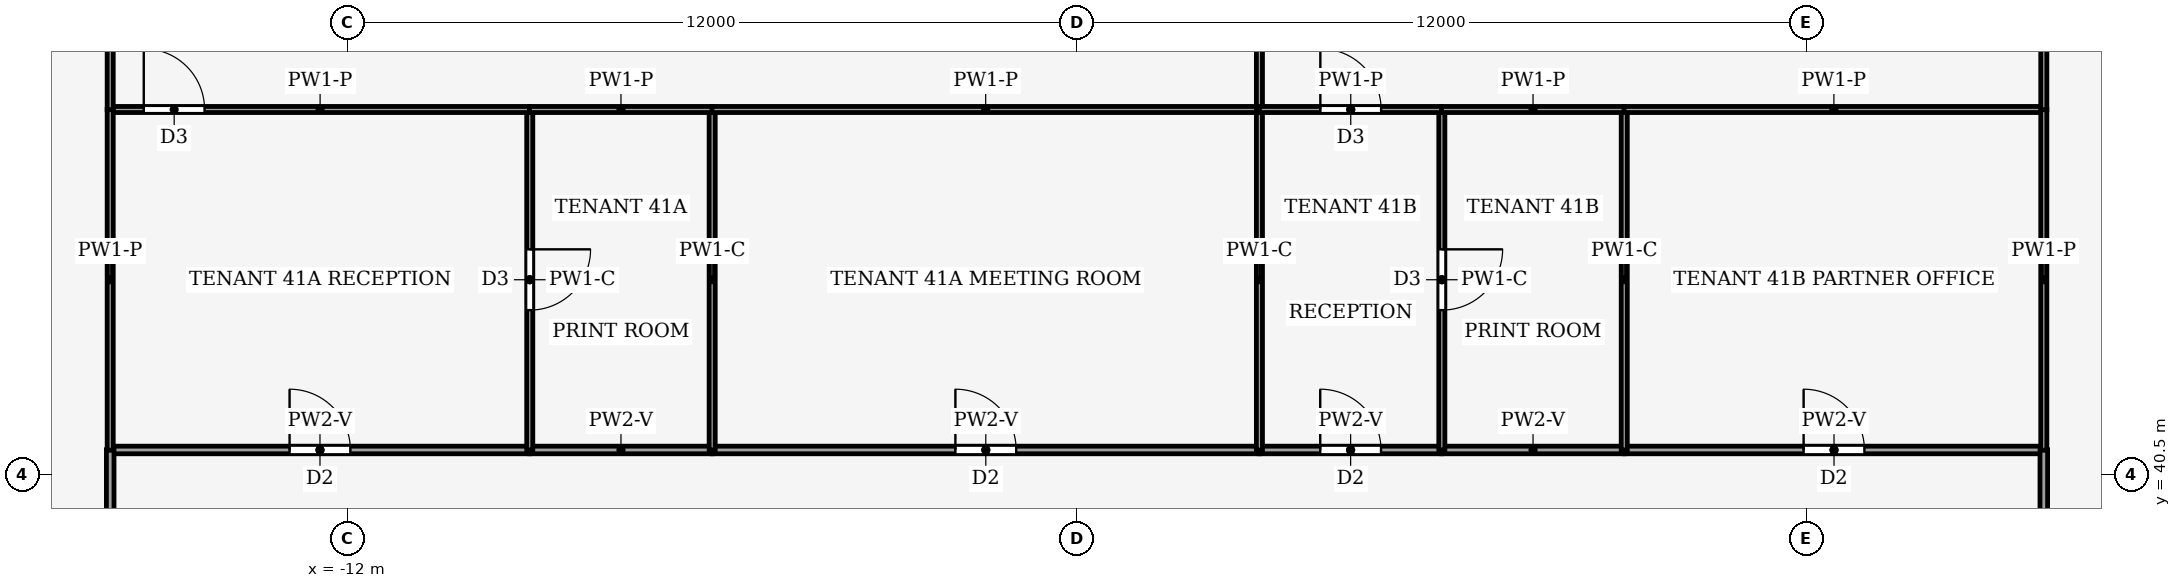
"""IFC4 building model, lengths in metres.
Left out: names, types, materials, properties, quantities, classifications, styles, units other than length and angle.
Written with IfcOpenShell. Run it as: python <this file> out.ifc"""

import sys

from ifc_helpers import new_model, si_unit, direction, frame, frame_2d, origin, place, context, subcontext, project, spatial, rectangle, extrude, element, fill, save


model = new_model("IFC4")
c1 = context("Model", 3, precision=1e-05, world=origin(), true_north=direction((0.0, 1.0)))
c2 = subcontext(c1, "Body", "Model", "MODEL_VIEW")
j1 = project(units=[si_unit("LENGTHUNIT", "METRE"), si_unit("PLANEANGLEUNIT", "RADIAN")], contexts=[c1])
p1 = place(None, origin())
s1 = spatial("IfcSite", under=j1, at=p1, CompositionType="ELEMENT")
p2 = place(p1, origin())
s2 = spatial("IfcBuilding", under=s1, at=p2, CompositionType="ELEMENT")
p3 = place(p2, frame((0.0, 0.0, 182.0)))
s3 = spatial("IfcBuildingStorey", under=s2, at=p3, CompositionType="ELEMENT", Elevation=182.0)
p4 = place(p3, frame((-15.9, 40.9, 0.0), z_axis=(0.0, 0.0, 1.0), x_axis=(1.0, 0.0, 0.0)))
e1 = element("IfcWall", 1, at=p4, inside=s3, PredefinedType="PARTITIONING", context=c2, shape_type="SweptSolid", body=[
    extrude(rectangle(XDim=6.9, YDim=0.125, at=frame_2d((3.45, 0.0))), origin(), (0.0, 0.0, 1.0), 3.44),
])
p5 = place(p4, frame((2.95, 0.0, 0.0)))
e2 = element("IfcOpeningElement", 2, at=p5, cuts=e1, PredefinedType="OPENING", context=c2, shape_type="SweptSolid", body=[
    extrude(rectangle(XDim=1.0, YDim=2.1, at=frame_2d((0.5, 1.05))), frame((0.0, 0.073, 0.0), z_axis=(0.0, -1.0, 0.0), x_axis=(1.0, 0.0, 0.0)), (0.0, 0.0, 1.0), 0.145),
])
p6 = place(p3, frame((-6.0, 40.9, 0.0), z_axis=(0.0, 0.0, 1.0), x_axis=(-1.0, 0.0, 0.0)))
e3 = element("IfcWall", 3, at=p6, inside=s3, PredefinedType="PARTITIONING", context=c2, shape_type="SweptSolid", body=[
    extrude(rectangle(XDim=3.0, YDim=0.125, at=frame_2d((1.5, 0.0))), origin(), (0.0, 0.0, 1.0), 3.44),
])
p7 = place(p3, frame((-6.0, 40.9, 0.0), z_axis=(0.0, 0.0, 1.0), x_axis=(1.0, 0.0, 0.0)))
e4 = element("IfcWall", 4, at=p7, inside=s3, PredefinedType="PARTITIONING", context=c2, shape_type="SweptSolid", body=[
    extrude(rectangle(XDim=9.0, YDim=0.125, at=frame_2d((4.5, 0.0))), origin(), (0.0, 0.0, 1.0), 3.44),
])
p8 = place(p7, frame((4.0, 0.0, 0.0)))
e5 = element("IfcOpeningElement", 5, at=p8, cuts=e4, PredefinedType="OPENING", context=c2, shape_type="SweptSolid", body=[
    extrude(rectangle(XDim=1.0, YDim=2.1, at=frame_2d((0.5, 1.05))), frame((0.0, 0.073, 0.0), z_axis=(0.0, -1.0, 0.0), x_axis=(1.0, 0.0, 0.0)), (0.0, 0.0, 1.0), 0.145),
])
p9 = place(p3, frame((3.0, 40.9, 0.0), z_axis=(0.0, 0.0, 1.0), x_axis=(1.0, 0.0, 0.0)))
e6 = element("IfcWall", 6, at=p9, inside=s3, PredefinedType="PARTITIONING", context=c2, shape_type="SweptSolid", body=[
    extrude(rectangle(XDim=3.0, YDim=0.125, at=frame_2d((1.5, 0.0))), origin(), (0.0, 0.0, 1.0), 3.44),
])
p10 = place(p9, frame((1.0, 0.0, 0.0)))
e7 = element("IfcOpeningElement", 7, at=p10, cuts=e6, PredefinedType="OPENING", context=c2, shape_type="SweptSolid", body=[
    extrude(rectangle(XDim=1.0, YDim=2.1, at=frame_2d((0.5, 1.05))), frame((0.0, 0.073, 0.0), z_axis=(0.0, -1.0, 0.0), x_axis=(1.0, 0.0, 0.0)), (0.0, 0.0, 1.0), 0.145),
])
p11 = place(p3, frame((9.0, 40.9, 0.0), z_axis=(0.0, 0.0, 1.0), x_axis=(-1.0, 0.0, 0.0)))
e8 = element("IfcWall", 8, at=p11, inside=s3, PredefinedType="PARTITIONING", context=c2, shape_type="SweptSolid", body=[
    extrude(rectangle(XDim=3.0, YDim=0.125, at=frame_2d((1.5, 0.0))), origin(), (0.0, 0.0, 1.0), 3.44),
])
p12 = place(p3, frame((9.0, 40.9, 0.0), z_axis=(0.0, 0.0, 1.0), x_axis=(1.0, 0.0, 0.0)))
e9 = element("IfcWall", 9, at=p12, inside=s3, PredefinedType="PARTITIONING", context=c2, shape_type="SweptSolid", body=[
    extrude(rectangle(XDim=6.9, YDim=0.125, at=frame_2d((3.45, 0.0))), origin(), (0.0, 0.0, 1.0), 3.44),
])
p13 = place(p12, frame((2.95, 0.0, 0.0)))
e10 = element("IfcOpeningElement", 10, at=p13, cuts=e9, PredefinedType="OPENING", context=c2, shape_type="SweptSolid", body=[
    extrude(rectangle(XDim=1.0, YDim=2.1, at=frame_2d((0.5, 1.05))), frame((0.0, 0.073, 0.0), z_axis=(0.0, -1.0, 0.0), x_axis=(1.0, 0.0, 0.0)), (0.0, 0.0, 1.0), 0.145),
])
p14 = place(p3, frame((-15.9, 34.5, 0.0), z_axis=(0.0, 0.0, 1.0), x_axis=(0.0, 1.0, 0.0)))
e11 = element("IfcWall", 11, at=p14, inside=s3, PredefinedType="PARTITIONING", context=c2, shape_type="SweptSolid", body=[
    extrude(rectangle(XDim=6.404, YDim=0.125, at=frame_2d((3.202, 0.0))), origin(), (0.0, 0.0, 1.0), 3.14),
])
p15 = place(p14, frame((2.702, 0.0, 0.0)))
e12 = element("IfcOpeningElement", 12, at=p15, cuts=e11, PredefinedType="OPENING", context=c2, shape_type="SweptSolid", body=[
    extrude(rectangle(XDim=1.0, YDim=2.1, at=frame_2d((0.5, 1.05))), frame((0.0, 0.073, 0.0), z_axis=(0.0, -1.0, 0.0), x_axis=(1.0, 0.0, 0.0)), (0.0, 0.0, 1.0), 0.145),
])
p16 = place(p3, frame((15.9, 40.904, 0.0), z_axis=(0.0, 0.0, 1.0), x_axis=(0.0, -1.0, 0.0)))
e13 = element("IfcWall", 13, at=p16, inside=s3, PredefinedType="PARTITIONING", context=c2, shape_type="SweptSolid", body=[
    extrude(rectangle(XDim=3.404, YDim=0.125, at=frame_2d((1.702, 0.0))), origin(), (0.0, 0.0, 1.0), 3.14),
])
p17 = place(p16, frame((1.202, 0.0, 0.0)))
e14 = element("IfcOpeningElement", 14, at=p17, cuts=e13, PredefinedType="OPENING", context=c2, shape_type="SweptSolid", body=[
    extrude(rectangle(XDim=1.0, YDim=2.1, at=frame_2d((0.5, 1.05))), frame((0.0, 0.073, 0.0), z_axis=(0.0, -1.0, 0.0), x_axis=(1.0, 0.0, 0.0)), (0.0, 0.0, 1.0), 0.145),
])
p18 = place(p3, frame((-9.0, 46.5, 0.0), z_axis=(0.0, 0.0, 1.0), x_axis=(0.0, -1.0, 0.0)))
e15 = element("IfcWall", 15, at=p18, inside=s3, PredefinedType="PARTITIONING", context=c2, shape_type="SweptSolid", body=[
    extrude(rectangle(XDim=5.6, YDim=0.1, at=frame_2d((2.8, 0.0))), origin(), (0.0, 0.0, 1.0), 3.87),
])
p19 = place(p18, frame((2.3, 0.0, 0.0)))
e16 = element("IfcOpeningElement", 16, at=p19, cuts=e15, PredefinedType="OPENING", context=c2, shape_type="SweptSolid", body=[
    extrude(rectangle(XDim=1.0, YDim=2.1, at=frame_2d((0.5, 1.05))), frame((0.0, 0.06, 0.0), z_axis=(0.0, -1.0, 0.0), x_axis=(1.0, 0.0, 0.0)), (0.0, 0.0, 1.0), 0.12),
])
p20 = place(p3, frame((-15.9, 46.5, 0.0), z_axis=(0.0, 0.0, 1.0), x_axis=(1.0, 0.0, 0.0)))
e17 = element("IfcWall", 17, at=p20, inside=s3, PredefinedType="PARTITIONING", context=c2, shape_type="SweptSolid", body=[
    extrude(rectangle(XDim=6.904, YDim=0.1, at=frame_2d((3.452, 0.0))), origin(), (0.0, 0.0, 1.0), 3.44),
])
p21 = place(p20, frame((0.552, 0.0, 0.0)))
e18 = element("IfcOpeningElement", 18, at=p21, cuts=e17, PredefinedType="OPENING", context=c2, shape_type="SweptSolid", body=[
    extrude(rectangle(XDim=1.0, YDim=2.1, at=frame_2d((0.5, 1.05))), frame((0.0, 0.06, 0.0), z_axis=(0.0, -1.0, 0.0), x_axis=(1.0, 0.0, 0.0)), (0.0, 0.0, 1.0), 0.12),
])
p22 = place(p3, frame((-15.9, 46.504, 0.0), z_axis=(0.0, 0.0, 1.0), x_axis=(0.0, -1.0, 0.0)))
e19 = element("IfcWall", 19, at=p22, inside=s3, PredefinedType="PARTITIONING", context=c2, shape_type="SweptSolid", body=[
    extrude(rectangle(XDim=5.608, YDim=0.1, at=frame_2d((2.804, 0.0))), origin(), (0.0, 0.0, 1.0), 3.44),
])
p23 = place(p3, frame((-6.0, 40.9, 0.0), z_axis=(0.0, 0.0, 1.0), x_axis=(0.0, 1.0, 0.0)))
e20 = element("IfcWall", 20, at=p23, inside=s3, PredefinedType="PARTITIONING", context=c2, shape_type="SweptSolid", body=[
    extrude(rectangle(XDim=5.6, YDim=0.1, at=frame_2d((2.8, 0.0))), origin(), (0.0, 0.0, 1.0), 3.87),
])
p24 = place(p3, frame((-5.996, 46.5, 0.0), z_axis=(0.0, 0.0, 1.0), x_axis=(-1.0, 0.0, 0.0)))
e21 = element("IfcWall", 21, at=p24, inside=s3, PredefinedType="PARTITIONING", context=c2, shape_type="SweptSolid", body=[
    extrude(rectangle(XDim=3.008, YDim=0.1, at=frame_2d((1.504, 0.0))), origin(), (0.0, 0.0, 1.0), 3.44),
])
p25 = place(p3, frame((3.0, 46.5, 0.0), z_axis=(0.0, 0.0, 1.0), x_axis=(-1.0, 0.0, 0.0)))
e22 = element("IfcWall", 22, at=p25, inside=s3, PredefinedType="PARTITIONING", context=c2, shape_type="SweptSolid", body=[
    extrude(rectangle(XDim=9.004, YDim=0.1, at=frame_2d((4.502, 0.0))), origin(), (0.0, 0.0, 1.0), 3.44),
])
p26 = place(p3, frame((3.0, 40.9, 0.0), z_axis=(0.0, 0.0, 1.0), x_axis=(0.0, 1.0, 0.0)))
e23 = element("IfcWall", 23, at=p26, inside=s3, PredefinedType="PARTITIONING", context=c2, shape_type="SweptSolid", body=[
    extrude(rectangle(XDim=5.6, YDim=0.1, at=frame_2d((2.8, 0.0))), origin(), (0.0, 0.0, 1.0), 3.87),
])
p27 = place(p3, frame((3.0, 46.5, 0.0), z_axis=(0.0, 0.0, 1.0), x_axis=(0.0, 1.0, 0.0)))
e24 = element("IfcWall", 24, at=p27, inside=s3, PredefinedType="PARTITIONING", context=c2, shape_type="SweptSolid", body=[
    extrude(rectangle(XDim=15.0, YDim=0.1, at=frame_2d((7.5, 0.0))), origin(), (0.0, 0.0, 1.0), 3.24),
])
p28 = place(p3, frame((-15.9, 61.504, 0.0), z_axis=(0.0, 0.0, 1.0), x_axis=(0.0, -1.0, 0.0)))
e25 = element("IfcWall", 25, at=p28, inside=s3, PredefinedType="PARTITIONING", context=c2, shape_type="SweptSolid", body=[
    extrude(rectangle(XDim=15.008, YDim=0.1, at=frame_2d((7.504, 0.0))), origin(), (0.0, 0.0, 1.0), 3.24),
])
p29 = place(p3, frame((6.0, 46.5, 0.0), z_axis=(0.0, 0.0, 1.0), x_axis=(0.0, -1.0, 0.0)))
e26 = element("IfcWall", 26, at=p29, inside=s3, PredefinedType="PARTITIONING", context=c2, shape_type="SweptSolid", body=[
    extrude(rectangle(XDim=5.6, YDim=0.1, at=frame_2d((2.8, 0.0))), origin(), (0.0, 0.0, 1.0), 3.87),
])
p30 = place(p29, frame((2.3, 0.0, 0.0)))
e27 = element("IfcOpeningElement", 27, at=p30, cuts=e26, PredefinedType="OPENING", context=c2, shape_type="SweptSolid", body=[
    extrude(rectangle(XDim=1.0, YDim=2.1, at=frame_2d((0.5, 1.05))), frame((0.0, 0.06, 0.0), z_axis=(0.0, -1.0, 0.0), x_axis=(1.0, 0.0, 0.0)), (0.0, 0.0, 1.0), 0.12),
])
p31 = place(p3, frame((3.0, 46.5, 0.0), z_axis=(0.0, 0.0, 1.0), x_axis=(1.0, 0.0, 0.0)))
e28 = element("IfcWall", 28, at=p31, inside=s3, PredefinedType="PARTITIONING", context=c2, shape_type="SweptSolid", body=[
    extrude(rectangle(XDim=3.004, YDim=0.1, at=frame_2d((1.502, 0.0))), origin(), (0.0, 0.0, 1.0), 3.44),
])
p32 = place(p31, frame((1.002, 0.0, 0.0)))
e29 = element("IfcOpeningElement", 29, at=p32, cuts=e28, PredefinedType="OPENING", context=c2, shape_type="SweptSolid", body=[
    extrude(rectangle(XDim=1.0, YDim=2.1, at=frame_2d((0.5, 1.05))), frame((0.0, 0.06, 0.0), z_axis=(0.0, -1.0, 0.0), x_axis=(1.0, 0.0, 0.0)), (0.0, 0.0, 1.0), 0.12),
])
p33 = place(p3, frame((9.0, 40.9, 0.0), z_axis=(0.0, 0.0, 1.0), x_axis=(0.0, 1.0, 0.0)))
e30 = element("IfcWall", 30, at=p33, inside=s3, PredefinedType="PARTITIONING", context=c2, shape_type="SweptSolid", body=[
    extrude(rectangle(XDim=5.6, YDim=0.1, at=frame_2d((2.8, 0.0))), origin(), (0.0, 0.0, 1.0), 3.87),
])
p34 = place(p3, frame((9.004, 46.5, 0.0), z_axis=(0.0, 0.0, 1.0), x_axis=(-1.0, 0.0, 0.0)))
e31 = element("IfcWall", 31, at=p34, inside=s3, PredefinedType="PARTITIONING", context=c2, shape_type="SweptSolid", body=[
    extrude(rectangle(XDim=3.008, YDim=0.1, at=frame_2d((1.504, 0.0))), origin(), (0.0, 0.0, 1.0), 3.44),
])
p35 = place(p3, frame((15.9, 46.5, 0.0), z_axis=(0.0, 0.0, 1.0), x_axis=(-1.0, 0.0, 0.0)))
e32 = element("IfcWall", 32, at=p35, inside=s3, PredefinedType="PARTITIONING", context=c2, shape_type="SweptSolid", body=[
    extrude(rectangle(XDim=6.904, YDim=0.1, at=frame_2d((3.452, 0.0))), origin(), (0.0, 0.0, 1.0), 3.44),
])
p36 = place(p3, frame((15.9, 40.896, 0.0), z_axis=(0.0, 0.0, 1.0), x_axis=(0.0, 1.0, 0.0)))
e33 = element("IfcWall", 33, at=p36, inside=s3, PredefinedType="PARTITIONING", context=c2, shape_type="SweptSolid", body=[
    extrude(rectangle(XDim=5.608, YDim=0.1, at=frame_2d((2.804, 0.0))), origin(), (0.0, 0.0, 1.0), 3.44),
])
p37 = place(p3, frame((15.9, 46.496, 0.0), z_axis=(0.0, 0.0, 1.0), x_axis=(0.0, 1.0, 0.0)))
e34 = element("IfcWall", 34, at=p37, inside=s3, PredefinedType="PARTITIONING", context=c2, shape_type="SweptSolid", body=[
    extrude(rectangle(XDim=15.008, YDim=0.1, at=frame_2d((7.504, 0.0))), origin(), (0.0, 0.0, 1.0), 3.24),
])
p38 = place(p5, origin())
e35 = element("IfcDoor", 35, at=p38, inside=s3, OperationType="SINGLE_SWING_LEFT", PredefinedType="DOOR", context=c2, shape_type="SweptSolid", body=[
    extrude(rectangle(XDim=1.0, YDim=2.1, at=frame_2d((0.5, 1.05))), frame((0.0, 0.025, 0.0), z_axis=(0.0, -1.0, 0.0), x_axis=(1.0, 0.0, 0.0)), (0.0, 0.0, 1.0), 0.05),
])
fill(e2, e35)
p39 = place(p8, origin())
e36 = element("IfcDoor", 36, at=p39, inside=s3, OperationType="SINGLE_SWING_RIGHT", PredefinedType="DOOR", context=c2, shape_type="SweptSolid", body=[
    extrude(rectangle(XDim=1.0, YDim=2.1, at=frame_2d((0.5, 1.05))), frame((0.0, 0.025, 0.0), z_axis=(0.0, -1.0, 0.0), x_axis=(1.0, 0.0, 0.0)), (0.0, 0.0, 1.0), 0.05),
])
fill(e5, e36)
p40 = place(p10, origin())
e37 = element("IfcDoor", 37, at=p40, inside=s3, OperationType="SINGLE_SWING_LEFT", PredefinedType="DOOR", context=c2, shape_type="SweptSolid", body=[
    extrude(rectangle(XDim=1.0, YDim=2.1, at=frame_2d((0.5, 1.05))), frame((0.0, 0.025, 0.0), z_axis=(0.0, -1.0, 0.0), x_axis=(1.0, 0.0, 0.0)), (0.0, 0.0, 1.0), 0.05),
])
fill(e7, e37)
p41 = place(p13, origin())
e38 = element("IfcDoor", 38, at=p41, inside=s3, OperationType="SINGLE_SWING_RIGHT", PredefinedType="DOOR", context=c2, shape_type="SweptSolid", body=[
    extrude(rectangle(XDim=1.0, YDim=2.1, at=frame_2d((0.5, 1.05))), frame((0.0, 0.025, 0.0), z_axis=(0.0, -1.0, 0.0), x_axis=(1.0, 0.0, 0.0)), (0.0, 0.0, 1.0), 0.05),
])
fill(e10, e38)
p42 = place(p19, origin())
e39 = element("IfcDoor", 39, at=p42, inside=s3, OperationType="SINGLE_SWING_RIGHT", PredefinedType="DOOR", context=c2, shape_type="SweptSolid", body=[
    extrude(rectangle(XDim=1.0, YDim=2.1, at=frame_2d((0.5, 1.05))), frame((0.0, 0.025, 0.0), z_axis=(0.0, -1.0, 0.0), x_axis=(1.0, 0.0, 0.0)), (0.0, 0.0, 1.0), 0.05),
])
fill(e16, e39)
p43 = place(p21, origin())
e40 = element("IfcDoor", 40, at=p43, inside=s3, OperationType="SINGLE_SWING_LEFT", PredefinedType="DOOR", context=c2, shape_type="SweptSolid", body=[
    extrude(rectangle(XDim=1.0, YDim=2.1, at=frame_2d((0.5, 1.05))), frame((0.0, 0.025, 0.0), z_axis=(0.0, -1.0, 0.0), x_axis=(1.0, 0.0, 0.0)), (0.0, 0.0, 1.0), 0.05),
])
fill(e18, e40)
p44 = place(p30, origin())
e41 = element("IfcDoor", 41, at=p44, inside=s3, OperationType="SINGLE_SWING_RIGHT", PredefinedType="DOOR", context=c2, shape_type="SweptSolid", body=[
    extrude(rectangle(XDim=1.0, YDim=2.1, at=frame_2d((0.5, 1.05))), frame((0.0, 0.025, 0.0), z_axis=(0.0, -1.0, 0.0), x_axis=(1.0, 0.0, 0.0)), (0.0, 0.0, 1.0), 0.05),
])
fill(e27, e41)
p45 = place(p32, origin())
e42 = element("IfcDoor", 42, at=p45, inside=s3, OperationType="SINGLE_SWING_LEFT", PredefinedType="DOOR", context=c2, shape_type="SweptSolid", body=[
    extrude(rectangle(XDim=1.0, YDim=2.1, at=frame_2d((0.5, 1.05))), frame((0.0, 0.025, 0.0), z_axis=(0.0, -1.0, 0.0), x_axis=(1.0, 0.0, 0.0)), (0.0, 0.0, 1.0), 0.05),
])
fill(e29, e42)
save(model, sys.argv[1])
